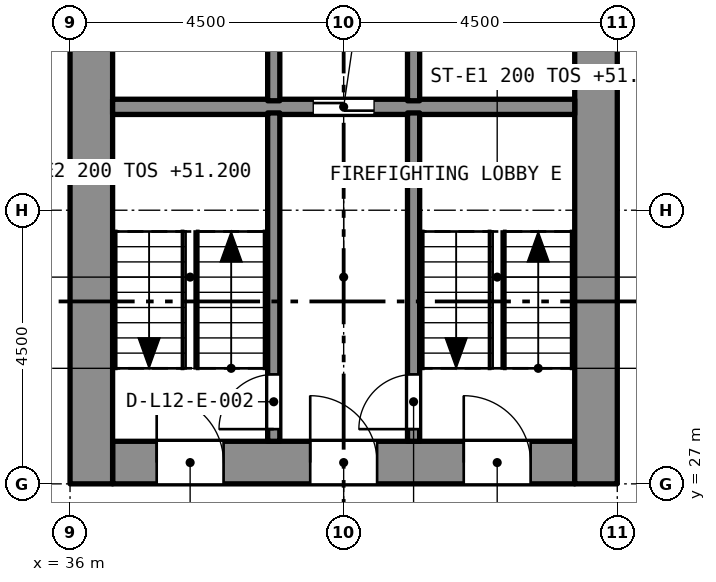
"""IFC4 building model, lengths in metres.
Left out: names, types, materials, properties, quantities, classifications, styles, units other than length and angle.
Written with IfcOpenShell. Run it as: python <this file> out.ifc"""

import sys

from ifc_helpers import new_model, si_unit, direction, frame, frame_2d, origin, place, context, subcontext, project, spatial, rectangle, extrude, element, fill, save


model = new_model("IFC4")
c1 = context("Model", 3, precision=1e-05, world=origin(), true_north=direction((0.0, 1.0)))
c2 = subcontext(c1, "Body", "Model", "MODEL_VIEW")
j1 = project(units=[si_unit("LENGTHUNIT", "METRE"), si_unit("PLANEANGLEUNIT", "RADIAN")], contexts=[c1])
p1 = place(None, origin())
s1 = spatial("IfcSite", under=j1, at=p1, CompositionType="ELEMENT")
p2 = place(p1, origin())
s2 = spatial("IfcBuilding", under=s1, at=p2, CompositionType="ELEMENT")
p3 = place(p2, frame((0.0, 0.0, 49.6)))
s3 = spatial("IfcBuildingStorey", under=s2, at=p3, CompositionType="ELEMENT", Elevation=49.6)
p4 = place(p3, frame((36.7, 27.35, 0.0), z_axis=(0.0, 0.0, 1.0), x_axis=(1.0, 0.0, 0.0)))
e1 = element("IfcWall", 1, at=p4, inside=s3, PredefinedType="SOLIDWALL", context=c2, shape_type="SweptSolid", body=[
    extrude(rectangle(XDim=7.6, YDim=0.7, at=frame_2d((3.8, 0.0))), origin(), (0.0, 0.0, 1.0), 3.2),
])
p5 = place(p4, frame((5.775, 0.0, 0.0)))
e2 = element("IfcOpeningElement", 2, at=p5, cuts=e1, PredefinedType="OPENING", context=c2, shape_type="SweptSolid", body=[
    extrude(rectangle(XDim=1.1, YDim=2.1, at=frame_2d((0.55, 1.05))), frame((0.0, 0.36, 0.0), z_axis=(0.0, -1.0, 0.0), x_axis=(1.0, 0.0, 0.0)), (0.0, 0.0, 1.0), 0.72),
])
p6 = place(p4, frame((3.25, 0.0, 0.0)))
e3 = element("IfcOpeningElement", 3, at=p6, cuts=e1, PredefinedType="OPENING", context=c2, shape_type="SweptSolid", body=[
    extrude(rectangle(XDim=1.1, YDim=2.1, at=frame_2d((0.55, 1.05))), frame((0.0, 0.36, 0.0), z_axis=(0.0, -1.0, 0.0), x_axis=(1.0, 0.0, 0.0)), (0.0, 0.0, 1.0), 0.72),
])
p7 = place(p4, frame((0.725, 0.0, 0.0)))
e4 = element("IfcOpeningElement", 4, at=p7, cuts=e1, PredefinedType="OPENING", context=c2, shape_type="SweptSolid", body=[
    extrude(rectangle(XDim=1.1, YDim=2.1, at=frame_2d((0.55, 1.05))), frame((0.0, 0.36, 0.0), z_axis=(0.0, -1.0, 0.0), x_axis=(1.0, 0.0, 0.0)), (0.0, 0.0, 1.0), 0.72),
])
p8 = place(p3, frame((36.35, 27.0, 0.0), z_axis=(0.0, 0.0, 1.0), x_axis=(0.0, 1.0, 0.0)))
e5 = element("IfcWall", 5, at=p8, inside=s3, PredefinedType="SOLIDWALL", context=c2, shape_type="SweptSolid", body=[
    extrude(rectangle(XDim=13.5, YDim=0.7, at=frame_2d((6.75, 0.0))), origin(), (0.0, 0.0, 1.0), 3.2),
])
p9 = place(p8, frame((8.95, 0.0, 0.0)))
e6 = element("IfcOpeningElement", 6, at=p9, cuts=e5, PredefinedType="OPENING", context=c2, shape_type="SweptSolid", body=[
    extrude(rectangle(XDim=1.2, YDim=2.1, at=frame_2d((0.6, 1.05))), frame((0.0, 0.36, 0.0), z_axis=(0.0, -1.0, 0.0), x_axis=(1.0, 0.0, 0.0)), (0.0, 0.0, 1.0), 0.72),
])
p10 = place(p3, frame((44.65, 27.0, 0.0), z_axis=(0.0, 0.0, 1.0), x_axis=(0.0, 1.0, 0.0)))
e7 = element("IfcWall", 7, at=p10, inside=s3, PredefinedType="SOLIDWALL", context=c2, shape_type="SweptSolid", body=[
    extrude(rectangle(XDim=13.5, YDim=0.7, at=frame_2d((6.75, 0.0))), origin(), (0.0, 0.0, 1.0), 3.2),
])
p11 = place(p10, frame((8.95, 0.0, 0.0)))
e8 = element("IfcOpeningElement", 8, at=p11, cuts=e7, PredefinedType="OPENING", context=c2, shape_type="SweptSolid", body=[
    extrude(rectangle(XDim=1.2, YDim=2.1, at=frame_2d((0.6, 1.05))), frame((0.0, 0.36, 0.0), z_axis=(0.0, -1.0, 0.0), x_axis=(1.0, 0.0, 0.0)), (0.0, 0.0, 1.0), 0.72),
])
p12 = place(p3, frame((36.7, 33.2, 0.0), z_axis=(0.0, 0.0, 1.0), x_axis=(1.0, 0.0, 0.0)))
e9 = element("IfcWall", 9, at=p12, inside=s3, PredefinedType="SOLIDWALL", context=c2, shape_type="SweptSolid", body=[
    extrude(rectangle(XDim=7.6, YDim=0.25, at=frame_2d((3.8, 0.0))), origin(), (0.0, 0.0, 1.0), 2.9),
])
p13 = place(p12, frame((3.3, 0.0, 0.0)))
e10 = element("IfcOpeningElement", 10, at=p13, cuts=e9, PredefinedType="OPENING", context=c2, shape_type="SweptSolid", body=[
    extrude(rectangle(XDim=1.0, YDim=2.1, at=frame_2d((0.5, 1.05))), frame((0.0, 0.135, 0.0), z_axis=(0.0, -1.0, 0.0), x_axis=(1.0, 0.0, 0.0)), (0.0, 0.0, 1.0), 0.27),
])
p14 = place(p3, frame((41.65, 27.7, 0.0), z_axis=(0.0, 0.0, 1.0), x_axis=(0.0, 1.0, 0.0)))
e11 = element("IfcWall", 11, at=p14, inside=s3, PredefinedType="SOLIDWALL", context=c2, shape_type="SweptSolid", body=[
    extrude(rectangle(XDim=5.4, YDim=0.2, at=frame_2d((2.7, 0.0))), origin(), (0.0, 0.0, 1.0), 2.9),
])
p15 = place(p14, frame((0.2, 0.0, 0.0)))
e12 = element("IfcOpeningElement", 12, at=p15, cuts=e11, PredefinedType="OPENING", context=c2, shape_type="SweptSolid", body=[
    extrude(rectangle(XDim=0.9, YDim=2.1, at=frame_2d((0.45, 1.05))), frame((0.0, 0.11, 0.0), z_axis=(0.0, -1.0, 0.0), x_axis=(1.0, 0.0, 0.0)), (0.0, 0.0, 1.0), 0.22),
])
p16 = place(p3, frame((39.35, 27.7, 0.0), z_axis=(0.0, 0.0, 1.0), x_axis=(0.0, 1.0, 0.0)))
e13 = element("IfcWall", 13, at=p16, inside=s3, PredefinedType="SOLIDWALL", context=c2, shape_type="SweptSolid", body=[
    extrude(rectangle(XDim=5.4, YDim=0.2, at=frame_2d((2.7, 0.0))), origin(), (0.0, 0.0, 1.0), 2.9),
])
p17 = place(p16, frame((0.2, 0.0, 0.0)))
e14 = element("IfcOpeningElement", 14, at=p17, cuts=e13, PredefinedType="OPENING", context=c2, shape_type="SweptSolid", body=[
    extrude(rectangle(XDim=0.9, YDim=2.1, at=frame_2d((0.45, 1.05))), frame((0.0, 0.11, 0.0), z_axis=(0.0, -1.0, 0.0), x_axis=(1.0, 0.0, 0.0)), (0.0, 0.0, 1.0), 0.22),
])
for number, where, z_axis, x_axis in (
    (15, (41.65, 33.3, 0.0), (0.0, 0.0, 1.0), (0.0, 1.0, 0.0)),
    (16, (39.35, 33.3, 0.0), (0.0, 0.0, 1.0), (0.0, 1.0, 0.0)),
):
    element("IfcWall", number, at=place(p3, frame(where, z_axis=z_axis, x_axis=x_axis)), inside=s3, PredefinedType="SOLIDWALL", context=c2, shape_type="SweptSolid", body=[
        extrude(rectangle(XDim=2.3, YDim=0.2, at=frame_2d((1.15, 0.0))), origin(), (0.0, 0.0, 1.0), 2.9),
    ])
p18 = place(p15, origin())
e17 = element("IfcDoor", 17, at=p18, inside=s3, OperationType="SINGLE_SWING_LEFT", PredefinedType="DOOR", context=c2, shape_type="SweptSolid", body=[
    extrude(rectangle(XDim=0.9, YDim=2.1, at=frame_2d((0.45, 1.05))), frame((0.0, 0.025, 0.0), z_axis=(0.0, -1.0, 0.0), x_axis=(1.0, 0.0, 0.0)), (0.0, 0.0, 1.0), 0.05),
])
fill(e12, e17)
p19 = place(p17, origin())
e18 = element("IfcDoor", 18, at=p19, inside=s3, OperationType="SINGLE_SWING_LEFT", PredefinedType="DOOR", context=c2, shape_type="SweptSolid", body=[
    extrude(rectangle(XDim=0.9, YDim=2.1, at=frame_2d((0.45, 1.05))), frame((0.0, 0.025, 0.0), z_axis=(0.0, -1.0, 0.0), x_axis=(1.0, 0.0, 0.0)), (0.0, 0.0, 1.0), 0.05),
])
fill(e14, e18)
p20 = place(p13, origin())
e19 = element("IfcDoor", 19, at=p20, inside=s3, OperationType="SLIDING_TO_LEFT", PredefinedType="DOOR", context=c2, shape_type="SweptSolid", body=[
    extrude(rectangle(XDim=1.0, YDim=2.1, at=frame_2d((0.5, 1.05))), frame((0.0, 0.025, 0.0), z_axis=(0.0, -1.0, 0.0), x_axis=(1.0, 0.0, 0.0)), (0.0, 0.0, 1.0), 0.05),
])
fill(e10, e19)
p21 = place(p5, origin())
e20 = element("IfcDoor", 20, at=p21, inside=s3, OperationType="SINGLE_SWING_LEFT", PredefinedType="DOOR", context=c2, shape_type="SweptSolid", body=[
    extrude(rectangle(XDim=1.1, YDim=2.1, at=frame_2d((0.55, 1.05))), frame((0.0, 0.025, 0.0), z_axis=(0.0, -1.0, 0.0), x_axis=(1.0, 0.0, 0.0)), (0.0, 0.0, 1.0), 0.05),
])
fill(e2, e20)
p22 = place(p6, origin())
e21 = element("IfcDoor", 21, at=p22, inside=s3, OperationType="SINGLE_SWING_LEFT", PredefinedType="DOOR", context=c2, shape_type="SweptSolid", body=[
    extrude(rectangle(XDim=1.1, YDim=2.1, at=frame_2d((0.55, 1.05))), frame((0.0, 0.025, 0.0), z_axis=(0.0, -1.0, 0.0), x_axis=(1.0, 0.0, 0.0)), (0.0, 0.0, 1.0), 0.05),
])
fill(e3, e21)
p23 = place(p7, origin())
e22 = element("IfcDoor", 22, at=p23, inside=s3, OperationType="SINGLE_SWING_LEFT", PredefinedType="DOOR", context=c2, shape_type="SweptSolid", body=[
    extrude(rectangle(XDim=1.1, YDim=2.1, at=frame_2d((0.55, 1.05))), frame((0.0, 0.025, 0.0), z_axis=(0.0, -1.0, 0.0), x_axis=(1.0, 0.0, 0.0)), (0.0, 0.0, 1.0), 0.05),
])
fill(e4, e22)
save(model, sys.argv[1])
